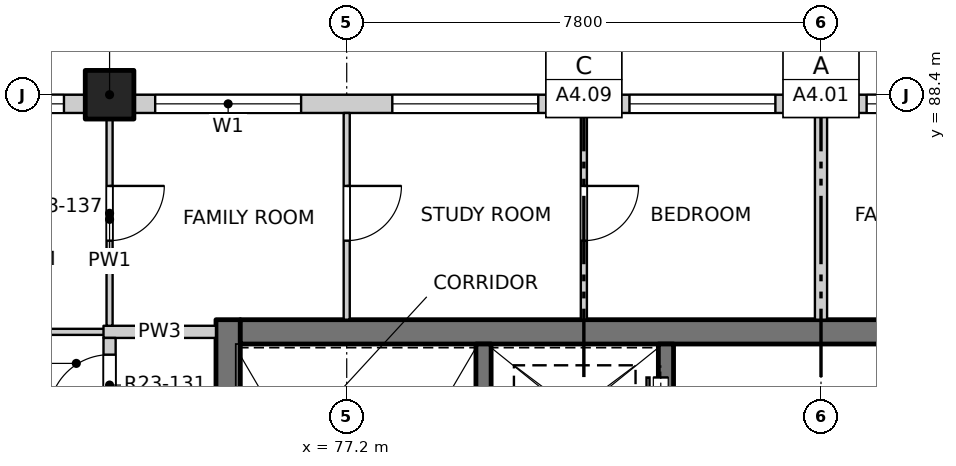
"""IFC4 building model, lengths in metres.
Left out: names, types, materials, properties, quantities, classifications, styles, units other than length and angle.
Written with IfcOpenShell. Run it as: python <this file> out.ifc"""

import sys

from ifc_helpers import new_model, si_unit, direction, frame, frame_2d, origin, origin_2d, place, context, subcontext, project, spatial, rectangle, extrude, element, fill, save


model = new_model("IFC4")
c1 = context("Model", 3, precision=1e-05, world=origin(), true_north=direction((0.0, 1.0)))
c2 = subcontext(c1, "Body", "Model", "MODEL_VIEW")
j1 = project(units=[si_unit("LENGTHUNIT", "METRE"), si_unit("PLANEANGLEUNIT", "RADIAN")], contexts=[c1])
p1 = place(None, origin())
s1 = spatial("IfcSite", under=j1, at=p1, CompositionType="ELEMENT")
p2 = place(p1, origin())
s2 = spatial("IfcBuilding", under=s1, at=p2, CompositionType="ELEMENT")
p3 = place(p2, frame((0.0, 0.0, 234.7)))
s3 = spatial("IfcBuildingStorey", under=s2, at=p3, CompositionType="ELEMENT", Elevation=234.7)
p4 = place(p3, frame((73.3, 88.4, -0.25), z_axis=(0.0, 0.0, 1.0), x_axis=(1.0, 0.0, 0.0)))
e1 = element("IfcColumn", 1, at=p4, inside=s3, PredefinedType="COLUMN", context=c2, shape_type="SweptSolid", body=[
    extrude(rectangle(XDim=0.8, YDim=0.8, at=origin_2d()), origin(), (0.0, 0.0, 1.0), 3.4),
])
p5 = place(p3, frame((75.25, 77.3, -0.25), z_axis=(0.0, 0.0, 1.0), x_axis=(0.0, 1.0, 0.0)))
e2 = element("IfcWall", 2, at=p5, inside=s3, PredefinedType="SOLIDWALL", context=c2, shape_type="SweptSolid", body=[
    extrude(rectangle(XDim=7.4, YDim=0.4, at=frame_2d((3.7, 0.0))), origin(), (0.0, 0.0, 1.0), 3.4),
])
p6 = place(p5, frame((0.3, 0.0, 0.25)))
e3 = element("IfcOpeningElement", 3, at=p6, cuts=e2, PredefinedType="OPENING", context=c2, shape_type="SweptSolid", body=[
    extrude(rectangle(XDim=1.2, YDim=2.1, at=frame_2d((0.6, 1.05))), frame((0.0, 0.21, 0.0), z_axis=(0.0, -1.0, 0.0), x_axis=(1.0, 0.0, 0.0)), (0.0, 0.0, 1.0), 0.42),
])
p7 = place(p3, frame((75.45, 84.5, -0.25), z_axis=(0.0, 0.0, 1.0), x_axis=(1.0, 0.0, 0.0)))
e4 = element("IfcWall", 4, at=p7, inside=s3, PredefinedType="SOLIDWALL", context=c2, shape_type="SweptSolid", body=[
    extrude(rectangle(XDim=19.1, YDim=0.4, at=frame_2d((9.55, 0.0))), origin(), (0.0, 0.0, 1.0), 3.4),
])
p8 = place(p3, frame((79.45, 77.3, -0.25), z_axis=(0.0, 0.0, 1.0), x_axis=(0.0, 1.0, 0.0)))
e5 = element("IfcWall", 5, at=p8, inside=s3, PredefinedType="SOLIDWALL", context=c2, shape_type="SweptSolid", body=[
    extrude(rectangle(XDim=7.0, YDim=0.25, at=frame_2d((3.5, 0.0))), origin(), (0.0, 0.0, 1.0), 3.4),
])
p9 = place(p3, frame((82.45, 82.025, -0.25), z_axis=(0.0, 0.0, 1.0), x_axis=(0.0, 1.0, 0.0)))
e6 = element("IfcWall", 6, at=p9, inside=s3, PredefinedType="SOLIDWALL", context=c2, shape_type="SweptSolid", body=[
    extrude(rectangle(XDim=2.275, YDim=0.25, at=frame_2d((1.138, 0.0))), origin(), (0.0, 0.0, 1.0), 3.4),
])
p10 = place(p9, frame((0.625, 0.0, 0.25)))
e7 = element("IfcOpeningElement", 7, at=p10, cuts=e6, PredefinedType="OPENING", context=c2, shape_type="SweptSolid", body=[
    extrude(rectangle(XDim=1.1, YDim=2.1, at=frame_2d((0.55, 1.05))), frame((0.0, 0.135, 0.0), z_axis=(0.0, -1.0, 0.0), x_axis=(1.0, 0.0, 0.0)), (0.0, 0.0, 1.0), 0.27),
])
p11 = place(p3, frame((65.5, 88.25, 0.0), z_axis=(0.0, 0.0, 1.0), x_axis=(1.0, 0.0, 0.0)))
e8 = element("IfcWall", 8, at=p11, inside=s3, PredefinedType="SOLIDWALL", context=c2, shape_type="SweptSolid", body=[
    extrude(rectangle(XDim=7.4, YDim=0.3, at=frame_2d((3.7, 0.0))), origin(), (0.0, 0.0, 1.0), 2.7),
])
p12 = place(p11, frame((0.75, 0.0, 0.9)))
e9 = element("IfcOpeningElement", 9, at=p12, cuts=e8, PredefinedType="OPENING", context=c2, shape_type="SweptSolid", body=[
    extrude(rectangle(XDim=2.4, YDim=1.8, at=frame_2d((1.2, 0.9))), frame((0.0, 0.16, 0.0), z_axis=(0.0, -1.0, 0.0), x_axis=(1.0, 0.0, 0.0)), (0.0, 0.0, 1.0), 0.32),
])
p13 = place(p11, frame((4.65, 0.0, 0.9)))
e10 = element("IfcOpeningElement", 10, at=p13, cuts=e8, PredefinedType="OPENING", context=c2, shape_type="SweptSolid", body=[
    extrude(rectangle(XDim=2.4, YDim=1.8, at=frame_2d((1.2, 0.9))), frame((0.0, 0.16, 0.0), z_axis=(0.0, -1.0, 0.0), x_axis=(1.0, 0.0, 0.0)), (0.0, 0.0, 1.0), 0.32),
])
p14 = place(p3, frame((73.7, 88.25, 0.0), z_axis=(0.0, 0.0, 1.0), x_axis=(1.0, 0.0, 0.0)))
e11 = element("IfcWall", 11, at=p14, inside=s3, PredefinedType="SOLIDWALL", context=c2, shape_type="SweptSolid", body=[
    extrude(rectangle(XDim=22.6, YDim=0.3, at=frame_2d((11.3, 0.0))), origin(), (0.0, 0.0, 1.0), 2.7),
])
p15 = place(p14, frame((0.35, 0.0, 0.9)))
e12 = element("IfcOpeningElement", 12, at=p15, cuts=e11, PredefinedType="OPENING", context=c2, shape_type="SweptSolid", body=[
    extrude(rectangle(XDim=2.4, YDim=1.8, at=frame_2d((1.2, 0.9))), frame((0.0, 0.16, 0.0), z_axis=(0.0, -1.0, 0.0), x_axis=(1.0, 0.0, 0.0)), (0.0, 0.0, 1.0), 0.32),
])
p16 = place(p14, frame((4.25, 0.0, 0.9)))
e13 = element("IfcOpeningElement", 13, at=p16, cuts=e11, PredefinedType="OPENING", context=c2, shape_type="SweptSolid", body=[
    extrude(rectangle(XDim=2.4, YDim=1.8, at=frame_2d((1.2, 0.9))), frame((0.0, 0.16, 0.0), z_axis=(0.0, -1.0, 0.0), x_axis=(1.0, 0.0, 0.0)), (0.0, 0.0, 1.0), 0.32),
])
p17 = place(p14, frame((8.15, 0.0, 0.9)))
e14 = element("IfcOpeningElement", 14, at=p17, cuts=e11, PredefinedType="OPENING", context=c2, shape_type="SweptSolid", body=[
    extrude(rectangle(XDim=2.4, YDim=1.8, at=frame_2d((1.2, 0.9))), frame((0.0, 0.16, 0.0), z_axis=(0.0, -1.0, 0.0), x_axis=(1.0, 0.0, 0.0)), (0.0, 0.0, 1.0), 0.32),
])
p18 = place(p14, frame((12.05, 0.0, 0.9)))
e15 = element("IfcOpeningElement", 15, at=p18, cuts=e11, PredefinedType="OPENING", context=c2, shape_type="SweptSolid", body=[
    extrude(rectangle(XDim=2.4, YDim=1.8, at=frame_2d((1.2, 0.9))), frame((0.0, 0.16, 0.0), z_axis=(0.0, -1.0, 0.0), x_axis=(1.0, 0.0, 0.0)), (0.0, 0.0, 1.0), 0.32),
])
p19 = place(p14, frame((15.95, 0.0, 0.9)))
e16 = element("IfcOpeningElement", 16, at=p19, cuts=e11, PredefinedType="OPENING", context=c2, shape_type="SweptSolid", body=[
    extrude(rectangle(XDim=2.4, YDim=1.8, at=frame_2d((1.2, 0.9))), frame((0.0, 0.16, 0.0), z_axis=(0.0, -1.0, 0.0), x_axis=(1.0, 0.0, 0.0)), (0.0, 0.0, 1.0), 0.32),
])
p20 = place(p14, frame((19.85, 0.0, 0.9)))
e17 = element("IfcOpeningElement", 17, at=p20, cuts=e11, PredefinedType="OPENING", context=c2, shape_type="SweptSolid", body=[
    extrude(rectangle(XDim=2.4, YDim=1.8, at=frame_2d((1.2, 0.9))), frame((0.0, 0.16, 0.0), z_axis=(0.0, -1.0, 0.0), x_axis=(1.0, 0.0, 0.0)), (0.0, 0.0, 1.0), 0.32),
])
p21 = place(p3, frame((61.9, 84.5, 0.0), z_axis=(0.0, 0.0, 1.0), x_axis=(1.0, 0.0, 0.0)))
e18 = element("IfcWall", 18, at=p21, inside=s3, PredefinedType="PARTITIONING", context=c2, shape_type="SweptSolid", body=[
    extrude(rectangle(XDim=11.5, YDim=0.1, at=frame_2d((5.75, 0.0))), origin(), (0.0, 0.0, 1.0), 3.15),
])
p22 = place(p21, frame((7.965, 0.0, 0.0)))
e19 = element("IfcOpeningElement", 19, at=p22, cuts=e18, PredefinedType="OPENING", context=c2, shape_type="SweptSolid", body=[
    extrude(rectangle(XDim=0.9, YDim=2.1, at=frame_2d((0.45, 1.05))), frame((0.0, 0.06, 0.0), z_axis=(0.0, -1.0, 0.0), x_axis=(1.0, 0.0, 0.0)), (0.0, 0.0, 1.0), 0.12),
])
p23 = place(p3, frame((73.2, 84.5, 0.0), z_axis=(0.0, 0.0, 1.0), x_axis=(1.0, 0.0, 0.0)))
e20 = element("IfcWall", 20, at=p23, inside=s3, PredefinedType="PARTITIONING", context=c2, shape_type="SweptSolid", body=[
    extrude(rectangle(XDim=1.85, YDim=0.2, at=frame_2d((0.925, 0.0))), origin(), (0.0, 0.0, 1.0), 3.15),
])
p24 = place(p3, frame((73.3, 49.5, 0.0), z_axis=(0.0, 0.0, 1.0), x_axis=(0.0, 1.0, 0.0)))
e21 = element("IfcWall", 21, at=p24, inside=s3, PredefinedType="PARTITIONING", context=c2, shape_type="SweptSolid", body=[
    extrude(rectangle(XDim=34.9, YDim=0.2, at=frame_2d((17.45, 0.0))), origin(), (0.0, 0.0, 1.0), 3.15),
])
p25 = place(p24, frame((3.075, 0.0, 0.0)))
e22 = element("IfcOpeningElement", 22, at=p25, cuts=e21, PredefinedType="OPENING", context=c2, shape_type="SweptSolid", body=[
    extrude(rectangle(XDim=1.0, YDim=2.1, at=frame_2d((0.5, 1.05))), frame((0.0, 0.11, 0.0), z_axis=(0.0, -1.0, 0.0), x_axis=(1.0, 0.0, 0.0)), (0.0, 0.0, 1.0), 0.22),
])
p26 = place(p24, frame((14.575, 0.0, 0.0)))
e23 = element("IfcOpeningElement", 23, at=p26, cuts=e21, PredefinedType="OPENING", context=c2, shape_type="SweptSolid", body=[
    extrude(rectangle(XDim=1.0, YDim=2.1, at=frame_2d((0.5, 1.05))), frame((0.0, 0.11, 0.0), z_axis=(0.0, -1.0, 0.0), x_axis=(1.0, 0.0, 0.0)), (0.0, 0.0, 1.0), 0.22),
])
p27 = place(p24, frame((33.625, 0.0, 0.0)))
e24 = element("IfcOpeningElement", 24, at=p27, cuts=e21, PredefinedType="OPENING", context=c2, shape_type="SweptSolid", body=[
    extrude(rectangle(XDim=1.0, YDim=2.1, at=frame_2d((0.5, 1.05))), frame((0.0, 0.11, 0.0), z_axis=(0.0, -1.0, 0.0), x_axis=(1.0, 0.0, 0.0)), (0.0, 0.0, 1.0), 0.22),
])
p28 = place(p3, frame((73.3, 84.6, 0.0), z_axis=(0.0, 0.0, 1.0), x_axis=(0.0, 1.0, 0.0)))
e25 = element("IfcWall", 25, at=p28, inside=s3, PredefinedType="PARTITIONING", context=c2, shape_type="SweptSolid", body=[
    extrude(rectangle(XDim=3.5, YDim=0.1, at=frame_2d((1.75, 0.0))), origin(), (0.0, 0.0, 1.0), 3.15),
])
p29 = place(p28, frame((1.4, 0.0, 0.0)))
e26 = element("IfcOpeningElement", 26, at=p29, cuts=e25, PredefinedType="OPENING", context=c2, shape_type="SweptSolid", body=[
    extrude(rectangle(XDim=0.9, YDim=2.1, at=frame_2d((0.45, 1.05))), frame((0.0, 0.06, 0.0), z_axis=(0.0, -1.0, 0.0), x_axis=(1.0, 0.0, 0.0)), (0.0, 0.0, 1.0), 0.12),
])
p30 = place(p3, frame((77.2, 84.7, 0.0), z_axis=(0.0, 0.0, 1.0), x_axis=(0.0, 1.0, 0.0)))
e27 = element("IfcWall", 27, at=p30, inside=s3, PredefinedType="PARTITIONING", context=c2, shape_type="SweptSolid", body=[
    extrude(rectangle(XDim=3.4, YDim=0.1, at=frame_2d((1.7, 0.0))), origin(), (0.0, 0.0, 1.0), 3.15),
])
p31 = place(p30, frame((1.3, 0.0, 0.0)))
e28 = element("IfcOpeningElement", 28, at=p31, cuts=e27, PredefinedType="OPENING", context=c2, shape_type="SweptSolid", body=[
    extrude(rectangle(XDim=0.9, YDim=2.1, at=frame_2d((0.45, 1.05))), frame((0.0, 0.06, 0.0), z_axis=(0.0, -1.0, 0.0), x_axis=(1.0, 0.0, 0.0)), (0.0, 0.0, 1.0), 0.12),
])
p32 = place(p3, frame((81.1, 84.7, 0.0), z_axis=(0.0, 0.0, 1.0), x_axis=(0.0, 1.0, 0.0)))
e29 = element("IfcWall", 29, at=p32, inside=s3, PredefinedType="PARTITIONING", context=c2, shape_type="SweptSolid", body=[
    extrude(rectangle(XDim=3.4, YDim=0.1, at=frame_2d((1.7, 0.0))), origin(), (0.0, 0.0, 1.0), 3.15),
])
p33 = place(p32, frame((1.3, 0.0, 0.0)))
e30 = element("IfcOpeningElement", 30, at=p33, cuts=e29, PredefinedType="OPENING", context=c2, shape_type="SweptSolid", body=[
    extrude(rectangle(XDim=0.9, YDim=2.1, at=frame_2d((0.45, 1.05))), frame((0.0, 0.06, 0.0), z_axis=(0.0, -1.0, 0.0), x_axis=(1.0, 0.0, 0.0)), (0.0, 0.0, 1.0), 0.12),
])
p34 = place(p3, frame((85.0, 84.7, 0.0), z_axis=(0.0, 0.0, 1.0), x_axis=(0.0, 1.0, 0.0)))
e31 = element("IfcWall", 31, at=p34, inside=s3, PredefinedType="PARTITIONING", context=c2, shape_type="SweptSolid", body=[
    extrude(rectangle(XDim=3.4, YDim=0.2, at=frame_2d((1.7, 0.0))), origin(), (0.0, 0.0, 1.0), 3.15),
])
p35 = place(p13, origin())
e32 = element("IfcWindow", 32, at=p35, inside=s3, PartitioningType="DOUBLE_PANEL_VERTICAL", PredefinedType="WINDOW", context=c2, shape_type="SweptSolid", body=[
    extrude(rectangle(XDim=2.4, YDim=1.8, at=frame_2d((1.2, 0.9))), frame((0.0, 0.03, 0.0), z_axis=(0.0, -1.0, 0.0), x_axis=(1.0, 0.0, 0.0)), (0.0, 0.0, 1.0), 0.06),
])
fill(e10, e32)
p36 = place(p15, origin())
e33 = element("IfcWindow", 33, at=p36, inside=s3, PartitioningType="DOUBLE_PANEL_VERTICAL", PredefinedType="WINDOW", context=c2, shape_type="SweptSolid", body=[
    extrude(rectangle(XDim=2.4, YDim=1.8, at=frame_2d((1.2, 0.9))), frame((0.0, 0.03, 0.0), z_axis=(0.0, -1.0, 0.0), x_axis=(1.0, 0.0, 0.0)), (0.0, 0.0, 1.0), 0.06),
])
fill(e12, e33)
p37 = place(p16, origin())
e34 = element("IfcWindow", 34, at=p37, inside=s3, PartitioningType="DOUBLE_PANEL_VERTICAL", PredefinedType="WINDOW", context=c2, shape_type="SweptSolid", body=[
    extrude(rectangle(XDim=2.4, YDim=1.8, at=frame_2d((1.2, 0.9))), frame((0.0, 0.03, 0.0), z_axis=(0.0, -1.0, 0.0), x_axis=(1.0, 0.0, 0.0)), (0.0, 0.0, 1.0), 0.06),
])
fill(e13, e34)
p38 = place(p17, origin())
e35 = element("IfcWindow", 35, at=p38, inside=s3, PartitioningType="DOUBLE_PANEL_VERTICAL", PredefinedType="WINDOW", context=c2, shape_type="SweptSolid", body=[
    extrude(rectangle(XDim=2.4, YDim=1.8, at=frame_2d((1.2, 0.9))), frame((0.0, 0.03, 0.0), z_axis=(0.0, -1.0, 0.0), x_axis=(1.0, 0.0, 0.0)), (0.0, 0.0, 1.0), 0.06),
])
fill(e14, e35)
p39 = place(p18, origin())
e36 = element("IfcWindow", 36, at=p39, inside=s3, PartitioningType="DOUBLE_PANEL_VERTICAL", PredefinedType="WINDOW", context=c2, shape_type="SweptSolid", body=[
    extrude(rectangle(XDim=2.4, YDim=1.8, at=frame_2d((1.2, 0.9))), frame((0.0, 0.03, 0.0), z_axis=(0.0, -1.0, 0.0), x_axis=(1.0, 0.0, 0.0)), (0.0, 0.0, 1.0), 0.06),
])
fill(e15, e36)
p40 = place(p10, origin())
e37 = element("IfcDoor", 37, at=p40, inside=s3, OperationType="SLIDING_TO_RIGHT", PredefinedType="DOOR", context=c2, shape_type="SweptSolid", body=[
    extrude(rectangle(XDim=1.1, YDim=2.1, at=frame_2d((0.55, 1.05))), frame((0.0, 0.11, 0.0), z_axis=(0.0, -1.0, 0.0), x_axis=(1.0, 0.0, 0.0)), (0.0, 0.0, 1.0), 0.05),
])
fill(e7, e37)
p41 = place(p27, origin())
e38 = element("IfcDoor", 38, at=p41, inside=s3, OperationType="SINGLE_SWING_RIGHT", PredefinedType="DOOR", context=c2, shape_type="SweptSolid", body=[
    extrude(rectangle(XDim=1.0, YDim=2.1, at=frame_2d((0.5, 1.05))), frame((0.0, 0.025, 0.0), z_axis=(0.0, -1.0, 0.0), x_axis=(1.0, 0.0, 0.0)), (0.0, 0.0, 1.0), 0.05),
])
fill(e24, e38)
p42 = place(p29, origin())
e39 = element("IfcDoor", 39, at=p42, inside=s3, OperationType="SINGLE_SWING_LEFT", PredefinedType="DOOR", context=c2, shape_type="SweptSolid", body=[
    extrude(rectangle(XDim=0.9, YDim=2.1, at=frame_2d((0.45, 1.05))), frame((0.0, 0.025, 0.0), z_axis=(0.0, -1.0, 0.0), x_axis=(1.0, 0.0, 0.0)), (0.0, 0.0, 1.0), 0.05),
])
fill(e26, e39)
p43 = place(p31, origin())
e40 = element("IfcDoor", 40, at=p43, inside=s3, OperationType="SINGLE_SWING_LEFT", PredefinedType="DOOR", context=c2, shape_type="SweptSolid", body=[
    extrude(rectangle(XDim=0.9, YDim=2.1, at=frame_2d((0.45, 1.05))), frame((0.0, 0.025, 0.0), z_axis=(0.0, -1.0, 0.0), x_axis=(1.0, 0.0, 0.0)), (0.0, 0.0, 1.0), 0.05),
])
fill(e28, e40)
p44 = place(p33, origin())
e41 = element("IfcDoor", 41, at=p44, inside=s3, OperationType="SINGLE_SWING_LEFT", PredefinedType="DOOR", context=c2, shape_type="SweptSolid", body=[
    extrude(rectangle(XDim=0.9, YDim=2.1, at=frame_2d((0.45, 1.05))), frame((0.0, 0.025, 0.0), z_axis=(0.0, -1.0, 0.0), x_axis=(1.0, 0.0, 0.0)), (0.0, 0.0, 1.0), 0.05),
])
fill(e30, e41)
save(model, sys.argv[1])
